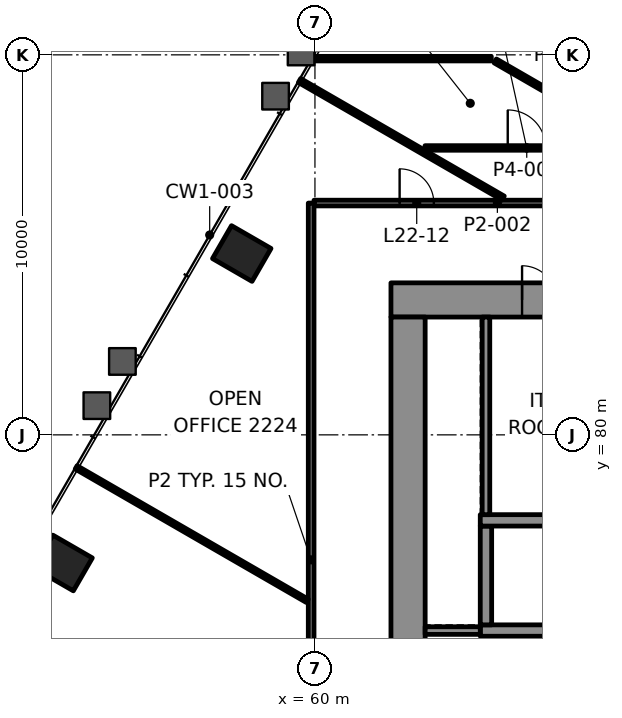
"""IFC4 building model, lengths in metres.
Left out: names, types, materials, properties, quantities, classifications, styles, units other than length and angle.
Written with IfcOpenShell. Run it as: python <this file> out.ifc"""

import sys

from ifc_helpers import new_model, si_unit, direction, frame, frame_2d, origin, origin_2d, place, context, subcontext, project, spatial, rectangle, extrude, element, fill, save


model = new_model("IFC4")
c1 = context("Model", 3, precision=1e-05, world=origin(), true_north=direction((0.0, 1.0)))
c2 = subcontext(c1, "Body", "Model", "MODEL_VIEW")
j1 = project(units=[si_unit("LENGTHUNIT", "METRE"), si_unit("PLANEANGLEUNIT", "RADIAN")], contexts=[c1])
p1 = place(None, origin())
s1 = spatial("IfcSite", under=j1, at=p1, CompositionType="ELEMENT")
p2 = place(p1, origin())
s2 = spatial("IfcBuilding", under=s1, at=p2, CompositionType="ELEMENT")
p3 = place(p2, frame((0.0, 0.0, 98.8)))
s3 = spatial("IfcBuildingStorey", under=s2, at=p3, CompositionType="ELEMENT", Elevation=98.8)
for number, where, z_axis, x_axis in (
    (1, (58.074, 84.772, -0.0), (0.0, 0.0, 1.0), (-0.5, -0.866, 0.0)),
    (2, (53.373, 76.628, -0.0), (0.0, 0.0, 1.0), (-0.5, -0.866, 0.0)),
):
    element("IfcColumn", number, at=place(p3, frame(where, z_axis=z_axis, x_axis=x_axis)), inside=s3, PredefinedType="COLUMN", context=c2, shape_type="SweptSolid", body=[
        extrude(rectangle(XDim=1.0, YDim=1.2, at=origin_2d()), origin(), (0.0, 0.0, 1.0), 4.2),
    ])
p4 = place(p3, frame((62.0, 83.55, 0.0), z_axis=(0.0, 0.0, 1.0), x_axis=(1.0, 0.0, 0.0)))
e3 = element("IfcWall", 3, at=p4, inside=s3, PredefinedType="SHEAR", context=c2, shape_type="SweptSolid", body=[
    extrude(rectangle(XDim=26.0, YDim=0.9, at=frame_2d((13.0, 0.0))), origin(), (0.0, 0.0, 1.0), 4.0),
])
p5 = place(p4, frame((5.695, 0.0, 0.0)))
e4 = element("IfcOpeningElement", 4, at=p5, cuts=e3, PredefinedType="OPENING", context=c2, shape_type="SweptSolid", body=[
    extrude(rectangle(XDim=1.0, YDim=2.1, at=frame_2d((0.5, 1.05))), frame((0.0, 0.46, 0.0), z_axis=(0.0, -1.0, 0.0), x_axis=(1.0, 0.0, 0.0)), (0.0, 0.0, 1.0), 0.92),
])
p6 = place(p4, frame((19.505, 0.0, 0.0)))
e5 = element("IfcOpeningElement", 5, at=p6, cuts=e3, PredefinedType="OPENING", context=c2, shape_type="SweptSolid", body=[
    extrude(rectangle(XDim=1.0, YDim=2.1, at=frame_2d((0.5, 1.05))), frame((0.0, 0.46, 0.0), z_axis=(0.0, -1.0, 0.0), x_axis=(1.0, 0.0, 0.0)), (0.0, 0.0, 1.0), 0.92),
])
p7 = place(p4, frame((3.45, 0.0, 0.0)))
e6 = element("IfcOpeningElement", 6, at=p7, cuts=e3, PredefinedType="OPENING", context=c2, shape_type="SweptSolid", body=[
    extrude(rectangle(XDim=0.9, YDim=2.1, at=frame_2d((0.45, 1.05))), frame((0.0, 0.46, 0.0), z_axis=(0.0, -1.0, 0.0), x_axis=(1.0, 0.0, 0.0)), (0.0, 0.0, 1.0), 0.92),
])
p8 = place(p4, frame((12.65, 0.0, 0.0)))
e7 = element("IfcOpeningElement", 7, at=p8, cuts=e3, PredefinedType="OPENING", context=c2, shape_type="SweptSolid", body=[
    extrude(rectangle(XDim=0.9, YDim=2.1, at=frame_2d((0.45, 1.05))), frame((0.0, 0.46, 0.0), z_axis=(0.0, -1.0, 0.0), x_axis=(1.0, 0.0, 0.0)), (0.0, 0.0, 1.0), 0.92),
])
p9 = place(p4, frame((22.55, 0.0, 0.0)))
e8 = element("IfcOpeningElement", 8, at=p9, cuts=e3, PredefinedType="OPENING", context=c2, shape_type="SweptSolid", body=[
    extrude(rectangle(XDim=0.9, YDim=2.1, at=frame_2d((0.45, 1.05))), frame((0.0, 0.46, 0.0), z_axis=(0.0, -1.0, 0.0), x_axis=(1.0, 0.0, 0.0)), (0.0, 0.0, 1.0), 0.92),
])
p10 = place(p3, frame((62.45, 66.9, 0.0), z_axis=(0.0, 0.0, 1.0), x_axis=(0.0, 1.0, 0.0)))
e9 = element("IfcWall", 9, at=p10, inside=s3, PredefinedType="SHEAR", context=c2, shape_type="SweptSolid", body=[
    extrude(rectangle(XDim=16.2, YDim=0.9, at=frame_2d((8.1, 0.0))), origin(), (0.0, 0.0, 1.0), 4.0),
])
p11 = place(p10, frame((5.5, 0.0, 0.0)))
e10 = element("IfcOpeningElement", 10, at=p11, cuts=e9, PredefinedType="OPENING", context=c2, shape_type="SweptSolid", body=[
    extrude(rectangle(XDim=1.8, YDim=2.1, at=frame_2d((0.9, 1.05))), frame((0.0, 0.46, 0.0), z_axis=(0.0, -1.0, 0.0), x_axis=(1.0, 0.0, 0.0)), (0.0, 0.0, 1.0), 0.92),
])
p12 = place(p3, frame((64.35, 74.85, 0.0), z_axis=(0.0, 0.0, 1.0), x_axis=(1.0, 0.0, 0.0)))
e11 = element("IfcWall", 11, at=p12, inside=s3, PredefinedType="SHEAR", context=c2, shape_type="SweptSolid", body=[
    extrude(rectangle(XDim=3.1, YDim=0.3, at=frame_2d((1.55, 0.0))), origin(), (0.0, 0.0, 1.0), 4.0),
])
p13 = place(p3, frame((64.5, 75.0, 0.0), z_axis=(0.0, 0.0, 1.0), x_axis=(0.0, 1.0, 0.0)))
e12 = element("IfcWall", 12, at=p13, inside=s3, PredefinedType="SHEAR", context=c2, shape_type="SweptSolid", body=[
    extrude(rectangle(XDim=2.6, YDim=0.3, at=frame_2d((1.3, 0.0))), origin(), (0.0, 0.0, 1.0), 4.0),
])
p14 = place(p3, frame((64.35, 77.75, 0.0), z_axis=(0.0, 0.0, 1.0), x_axis=(1.0, 0.0, 0.0)))
e13 = element("IfcWall", 13, at=p14, inside=s3, PredefinedType="SHEAR", context=c2, shape_type="SweptSolid", body=[
    extrude(rectangle(XDim=22.75, YDim=0.3, at=frame_2d((11.375, 0.0))), origin(), (0.0, 0.0, 1.0), 4.0),
])
p15 = place(p14, frame((3.345, 0.0, 0.0)))
e14 = element("IfcOpeningElement", 14, at=p15, cuts=e13, PredefinedType="OPENING", context=c2, shape_type="SweptSolid", body=[
    extrude(rectangle(XDim=1.0, YDim=2.1, at=frame_2d((0.5, 1.05))), frame((0.0, 0.16, 0.0), z_axis=(0.0, -1.0, 0.0), x_axis=(1.0, 0.0, 0.0)), (0.0, 0.0, 1.0), 0.32),
])
p16 = place(p3, frame((59.976, 86.1, 0.0), z_axis=(0.0, 0.0, 1.0), x_axis=(1.0, 0.0, 0.0)))
e15 = element("IfcWall", 15, at=p16, inside=s3, PredefinedType="PARTITIONING", context=c2, shape_type="SweptSolid", body=[
    extrude(rectangle(XDim=9.649, YDim=0.15, at=frame_2d((4.825, 0.0))), origin(), (0.0, 0.0, 1.0), 3.4),
])
p17 = place(p16, frame((2.252, 0.0, 0.0)))
e16 = element("IfcOpeningElement", 16, at=p17, cuts=e15, PredefinedType="OPENING", context=c2, shape_type="SweptSolid", body=[
    extrude(rectangle(XDim=0.9, YDim=2.1, at=frame_2d((0.45, 1.05))), frame((0.0, 0.085, 0.0), z_axis=(0.0, -1.0, 0.0), x_axis=(1.0, 0.0, 0.0)), (0.0, 0.0, 1.0), 0.17),
])
p18 = place(p16, frame((6.723, 0.0, 0.0)))
e17 = element("IfcOpeningElement", 17, at=p18, cuts=e15, PredefinedType="OPENING", context=c2, shape_type="SweptSolid", body=[
    extrude(rectangle(XDim=1.2, YDim=2.1, at=frame_2d((0.6, 1.05))), frame((0.0, 0.085, 0.0), z_axis=(0.0, -1.0, 0.0), x_axis=(1.0, 0.0, 0.0)), (0.0, 0.0, 1.0), 0.17),
])
p19 = place(p3, frame((62.896, 87.55, 0.0), z_axis=(0.0, 0.0, 1.0), x_axis=(1.0, 0.0, 0.0)))
e18 = element("IfcWall", 18, at=p19, inside=s3, PredefinedType="PARTITIONING", context=c2, shape_type="SweptSolid", body=[
    extrude(rectangle(XDim=5.354, YDim=0.12, at=frame_2d((2.677, 0.0))), origin(), (0.0, 0.0, 1.0), 3.4),
])
p20 = place(p19, frame((2.177, 0.0, 0.0)))
e19 = element("IfcOpeningElement", 19, at=p20, cuts=e18, PredefinedType="OPENING", context=c2, shape_type="SweptSolid", body=[
    extrude(rectangle(XDim=1.0, YDim=2.1, at=frame_2d((0.5, 1.05))), frame((0.0, 0.07, 0.0), z_axis=(0.0, -1.0, 0.0), x_axis=(1.0, 0.0, 0.0)), (0.0, 0.0, 1.0), 0.14),
])
p21 = place(p3, frame((59.927, 89.9, 0.0), z_axis=(0.0, 0.0, 1.0), x_axis=(1.0, 0.0, 0.0)))
e20 = element("IfcWall", 20, at=p21, inside=s3, PredefinedType="PARTITIONING", context=c2, shape_type="SweptSolid", body=[
    extrude(rectangle(XDim=4.714, YDim=0.12, at=frame_2d((2.357, 0.0))), origin(), (0.0, 0.0, 1.0), 3.165),
])
p22 = place(p3, frame((59.9, 67.321, 0.0), z_axis=(0.0, 0.0, 1.0), x_axis=(0.0, 1.0, 0.0)))
e21 = element("IfcWall", 21, at=p22, inside=s3, PredefinedType="PARTITIONING", context=c2, shape_type="SweptSolid", body=[
    extrude(rectangle(XDim=18.778, YDim=0.15, at=frame_2d((9.389, 0.0))), origin(), (0.0, 0.0, 1.0), 3.4),
])
p23 = place(p3, frame((68.155, 87.871, 0.0), z_axis=(0.0, 0.0, 1.0), x_axis=(-0.866041060244, 0.499972881236, 0.0)))
e22 = element("IfcWall", 22, at=p23, inside=s3, PredefinedType="PARTITIONING", context=c2, shape_type="SweptSolid", body=[
    extrude(rectangle(XDim=3.938, YDim=0.12, at=frame_2d((1.969, 0.0))), origin(), (0.0, 0.0, 1.0), 3.4),
])
p24 = place(p3, frame((64.953, 86.23, 0.0), z_axis=(0.0, 0.0, 1.0), x_axis=(-0.866029863972, 0.499992274648, 0.0)))
e23 = element("IfcWall", 23, at=p24, inside=s3, PredefinedType="PARTITIONING", context=c2, shape_type="SweptSolid", body=[
    extrude(rectangle(XDim=6.188, YDim=0.12, at=frame_2d((3.094, 0.0))), origin(), (0.0, 0.0, 1.0), 3.165),
])
p25 = place(p3, frame((59.799, 75.632, 0.0), z_axis=(0.0, 0.0, 1.0), x_axis=(-0.866018287837, 0.500012324981, 0.0)))
e24 = element("IfcWall", 24, at=p25, inside=s3, PredefinedType="PARTITIONING", context=c2, shape_type="SweptSolid", body=[
    extrude(rectangle(XDim=7.023, YDim=0.1, at=frame_2d((3.512, 0.0))), origin(), (0.0, 0.0, 1.0), 3.165),
])
p26 = place(p3, frame((62.9, 74.85, 0.0), z_axis=(0.0, 0.0, 1.0), x_axis=(1.0, 0.0, 0.0)))
e25 = element("IfcWall", 25, at=p26, inside=s3, PredefinedType="PARTITIONING", context=c2, shape_type="SweptSolid", body=[
    extrude(rectangle(XDim=1.45, YDim=0.2, at=frame_2d((0.725, 0.0))), origin(), (0.0, 0.0, 1.0), 4.0),
])
p27 = place(p3, frame((64.5, 77.9, 0.0), z_axis=(0.0, 0.0, 1.0), x_axis=(0.0, 1.0, 0.0)))
e26 = element("IfcWall", 26, at=p27, inside=s3, PredefinedType="PARTITIONING", context=c2, shape_type="SweptSolid", body=[
    extrude(rectangle(XDim=5.2, YDim=0.2, at=frame_2d((2.6, 0.0))), origin(), (0.0, 0.0, 1.0), 4.0),
])
p28 = place(p17, origin())
e27 = element("IfcDoor", 27, at=p28, inside=s3, OperationType="SINGLE_SWING_LEFT", PredefinedType="DOOR", context=c2, shape_type="SweptSolid", body=[
    extrude(rectangle(XDim=0.9, YDim=2.1, at=frame_2d((0.45, 1.05))), frame((0.0, 0.025, 0.0), z_axis=(0.0, -1.0, 0.0), x_axis=(1.0, 0.0, 0.0)), (0.0, 0.0, 1.0), 0.05),
])
fill(e16, e27)
p29 = place(p20, origin())
e28 = element("IfcDoor", 28, at=p29, inside=s3, OperationType="SINGLE_SWING_RIGHT", PredefinedType="DOOR", context=c2, shape_type="SweptSolid", body=[
    extrude(rectangle(XDim=1.0, YDim=2.1, at=frame_2d((0.5, 1.05))), frame((0.0, 0.025, 0.0), z_axis=(0.0, -1.0, 0.0), x_axis=(1.0, 0.0, 0.0)), (0.0, 0.0, 1.0), 0.05),
])
fill(e19, e28)
p30 = place(p7, origin())
e29 = element("IfcDoor", 29, at=p30, inside=s3, OperationType="SINGLE_SWING_RIGHT", PredefinedType="DOOR", context=c2, shape_type="SweptSolid", body=[
    extrude(rectangle(XDim=0.9, YDim=2.1, at=frame_2d((0.45, 1.05))), frame((0.0, 0.17, 0.0), z_axis=(0.0, -1.0, 0.0), x_axis=(1.0, 0.0, 0.0)), (0.0, 0.0, 1.0), 0.34),
])
fill(e6, e29)
save(model, sys.argv[1])
